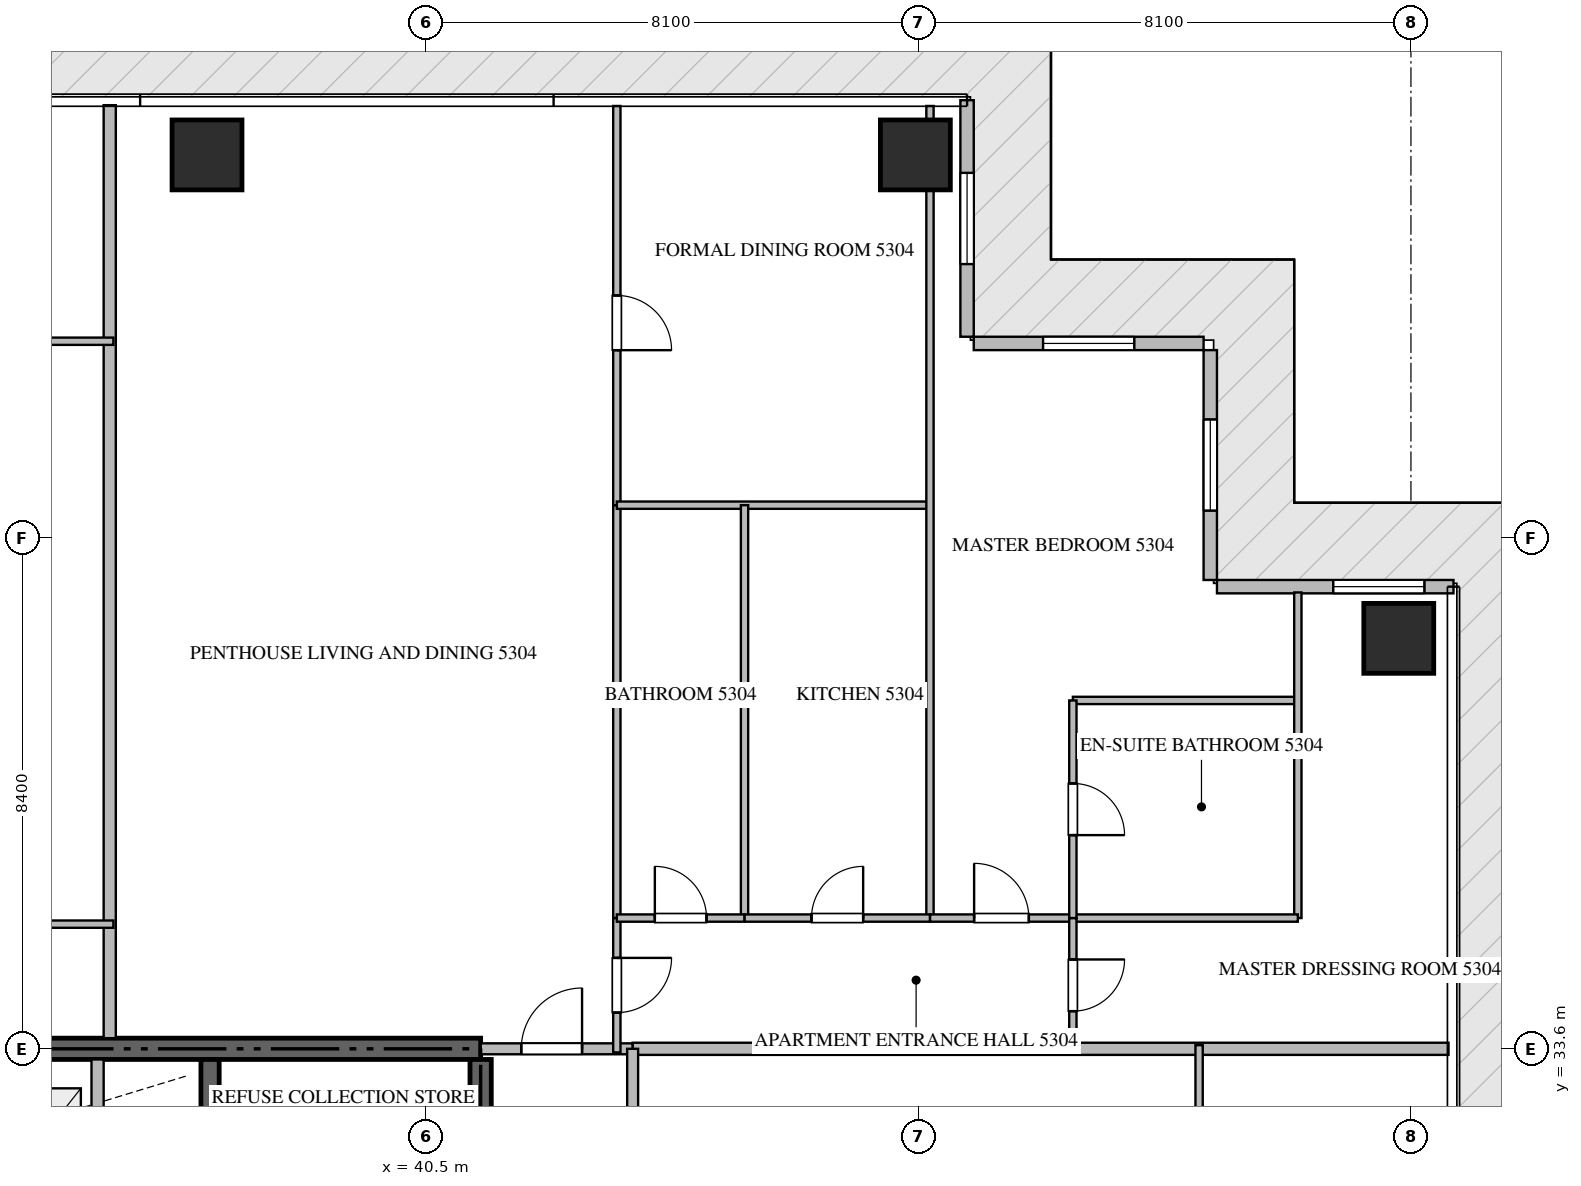
"""IFC4 building model, lengths in metres.
Left out: names, types, materials, properties, quantities, classifications, styles, units other than length and angle.
Written with IfcOpenShell. Run it as: python <this file> out.ifc"""

import sys

from ifc_helpers import new_model, si_unit, direction, frame, frame_2d, origin, origin_2d, place, context, subcontext, project, spatial, rectangle, extrude, source, transform, mapped, element, fill, save


model = new_model("IFC4")
c1 = context("Model", 3, precision=1e-05, world=origin(), true_north=direction((0.0, 1.0)))
c2 = subcontext(c1, "Body", "Model", "MODEL_VIEW")
j1 = project(units=[si_unit("LENGTHUNIT", "METRE"), si_unit("PLANEANGLEUNIT", "RADIAN")], contexts=[c1])
p1 = place(None, origin())
s1 = spatial("IfcSite", under=j1, at=p1, CompositionType="ELEMENT")
p2 = place(p1, origin())
s2 = spatial("IfcBuilding", under=s1, at=p2, CompositionType="ELEMENT")
p3 = place(p2, frame((0.0, 0.0, 214.3)))
s3 = spatial("IfcBuildingStorey", under=s2, at=p3, CompositionType="ELEMENT", Elevation=214.3)
p4 = place(p3, frame((41.4, 33.6, -0.26), z_axis=(0.0, 0.0, 1.0), x_axis=(-1.0, 0.0, 0.0)))
e1 = element("IfcWall", 1, at=p4, inside=s3, PredefinedType="SHEAR", context=c2, shape_type="SweptSolid", body=[
    extrude(rectangle(XDim=18.0, YDim=0.35, at=frame_2d((9.0, 0.0))), origin(), (0.0, 0.0, 1.0), 3.848),
])
p5 = place(p3, frame((41.4, 27.75, -0.26), z_axis=(0.0, 0.0, 1.0), x_axis=(0.0, 1.0, 0.0)))
e2 = element("IfcWall", 2, at=p5, inside=s3, PredefinedType="SHEAR", context=c2, shape_type="SweptSolid", body=[
    extrude(rectangle(XDim=5.675, YDim=0.35, at=frame_2d((2.837, 0.0))), origin(), (0.0, 0.0, 1.0), 3.848),
])
p6 = place(p3, frame((36.95, 27.05, -0.26), z_axis=(0.0, 0.0, 1.0), x_axis=(0.0, 1.0, 0.0)))
e3 = element("IfcWall", 3, at=p6, inside=s3, PredefinedType="SHEAR", context=c2, shape_type="SweptSolid", body=[
    extrude(rectangle(XDim=6.375, YDim=0.3, at=frame_2d((3.188, 0.0))), origin(), (0.0, 0.0, 1.0), 3.848),
])
m1 = source(origin(), c2, "Body", "SweptSolid", [
    extrude(rectangle(XDim=1.15, YDim=1.15, at=origin_2d()), origin(), (0.0, 0.0, 1.0), 3.85),
])
for number, where, z_axis, x_axis in (
    (4, (36.9, 48.3, -0.26), (0.0, 0.0, 1.0), (1.0, 0.0, 0.0)),
    (5, (48.55, 48.3, -0.26), (0.0, 0.0, 1.0), (1.0, 0.0, 0.0)),
    (6, (56.5, 40.35, -0.26), (0.0, 0.0, 1.0), (1.0, 0.0, 0.0)),
):
    element("IfcColumn", number, at=place(p3, frame(where, z_axis=z_axis, x_axis=x_axis)), inside=s3, PredefinedType="COLUMN", context=c2, shape_type="MappedRepresentation", body=[
        mapped(m1, transform((0.0, 0.0, 0.0), scale=1.0)),
    ])
p7 = place(p3, frame((57.4, 41.2, 0.0), z_axis=(0.0, 0.0, 1.0), x_axis=(-1.0, 0.0, 0.0)))
e7 = element("IfcWall", 7, at=p7, inside=s3, PredefinedType="ELEMENTEDWALL", context=c2, shape_type="SweptSolid", body=[
    extrude(rectangle(XDim=3.89, YDim=0.22, at=frame_2d((1.945, 0.0))), origin(), (0.0, 0.0, 1.0), 3.575),
])
p8 = place(p7, frame((0.478, 0.0, 0.65)))
e8 = element("IfcOpeningElement", 8, at=p8, cuts=e7, PredefinedType="OPENING", context=c2, shape_type="SweptSolid", body=[
    extrude(rectangle(XDim=1.5, YDim=2.25, at=frame_2d((0.75, 1.125))), frame((0.0, 0.12, 0.0), z_axis=(0.0, -1.0, 0.0), x_axis=(1.0, 0.0, 0.0)), (0.0, 0.0, 1.0), 0.24),
])
p9 = place(p3, frame((53.4, 41.31, 0.0), z_axis=(0.0, 0.0, 1.0), x_axis=(0.0, 1.0, 0.0)))
e9 = element("IfcWall", 9, at=p9, inside=s3, PredefinedType="ELEMENTEDWALL", context=c2, shape_type="SweptSolid", body=[
    extrude(rectangle(XDim=3.78, YDim=0.22, at=frame_2d((1.89, 0.0))), origin(), (0.0, 0.0, 1.0), 3.575),
])
p10 = place(p9, frame((1.14, 0.0, 0.65)))
e10 = element("IfcOpeningElement", 10, at=p10, cuts=e9, PredefinedType="OPENING", context=c2, shape_type="SweptSolid", body=[
    extrude(rectangle(XDim=1.5, YDim=2.25, at=frame_2d((0.75, 1.125))), frame((0.0, 0.12, 0.0), z_axis=(0.0, -1.0, 0.0), x_axis=(1.0, 0.0, 0.0)), (0.0, 0.0, 1.0), 0.24),
])
p11 = place(p3, frame((53.29, 45.2, 0.0), z_axis=(0.0, 0.0, 1.0), x_axis=(-1.0, 0.0, 0.0)))
e11 = element("IfcWall", 11, at=p11, inside=s3, PredefinedType="ELEMENTEDWALL", context=c2, shape_type="SweptSolid", body=[
    extrude(rectangle(XDim=3.78, YDim=0.22, at=frame_2d((1.89, 0.0))), origin(), (0.0, 0.0, 1.0), 3.575),
])
p12 = place(p11, frame((1.14, 0.0, 0.65)))
e12 = element("IfcOpeningElement", 12, at=p12, cuts=e11, PredefinedType="OPENING", context=c2, shape_type="SweptSolid", body=[
    extrude(rectangle(XDim=1.5, YDim=2.25, at=frame_2d((0.75, 1.125))), frame((0.0, 0.12, 0.0), z_axis=(0.0, -1.0, 0.0), x_axis=(1.0, 0.0, 0.0)), (0.0, 0.0, 1.0), 0.24),
])
p13 = place(p3, frame((49.4, 45.31, 0.0), z_axis=(0.0, 0.0, 1.0), x_axis=(0.0, 1.0, 0.0)))
e13 = element("IfcWall", 13, at=p13, inside=s3, PredefinedType="ELEMENTEDWALL", context=c2, shape_type="SweptSolid", body=[
    extrude(rectangle(XDim=3.89, YDim=0.22, at=frame_2d((1.945, 0.0))), origin(), (0.0, 0.0, 1.0), 3.575),
])
p14 = place(p13, frame((1.195, 0.0, 0.65)))
e14 = element("IfcOpeningElement", 14, at=p14, cuts=e13, PredefinedType="OPENING", context=c2, shape_type="SweptSolid", body=[
    extrude(rectangle(XDim=1.5, YDim=2.25, at=frame_2d((0.75, 1.125))), frame((0.0, 0.12, 0.0), z_axis=(0.0, -1.0, 0.0), x_axis=(1.0, 0.0, 0.0)), (0.0, 0.0, 1.0), 0.24),
])
p15 = place(p3, frame((35.1, 30.75, 0.0), z_axis=(0.0, 0.0, 1.0), x_axis=(0.0, 1.0, 0.0)))
e15 = element("IfcWall", 15, at=p15, inside=s3, PredefinedType="STANDARD", context=c2, shape_type="SweptSolid", body=[
    extrude(rectangle(XDim=2.675, YDim=0.2, at=frame_2d((1.337, 0.0))), origin(), (0.0, 0.0, 1.0), 3.59),
])
p16 = place(p3, frame((35.3, 33.775, 0.0), z_axis=(0.0, 0.0, 1.0), x_axis=(0.0, 1.0, 0.0)))
e16 = element("IfcWall", 16, at=p16, inside=s3, PredefinedType="PARTITIONING", context=c2, shape_type="SweptSolid", body=[
    extrude(rectangle(XDim=15.343, YDim=0.2, at=frame_2d((7.671, 0.0))), origin(), (0.0, 0.0, 1.0), 3.59),
])
p17 = place(p3, frame((43.9, 33.6, 0.0), z_axis=(0.0, 0.0, 1.0), x_axis=(1.0, 0.0, 0.0)))
e17 = element("IfcWall", 17, at=p17, inside=s3, PredefinedType="PARTITIONING", context=c2, shape_type="SweptSolid", body=[
    extrude(rectangle(XDim=13.418, YDim=0.2, at=frame_2d((6.709, 0.0))), origin(), (0.0, 0.0, 1.0), 3.59),
])
p18 = place(p3, frame((41.402, 33.6, 0.0), z_axis=(0.0, 0.0, 1.0), x_axis=(1.0, 0.0, 0.0)))
e18 = element("IfcWall", 18, at=p18, inside=s3, PredefinedType="PARTITIONING", context=c2, shape_type="SweptSolid", body=[
    extrude(rectangle(XDim=2.496, YDim=0.18, at=frame_2d((1.248, 0.0))), origin(), (0.0, 0.0, 1.0), 3.59),
])
p19 = place(p18, frame((0.666, 0.0, 0.0)))
e19 = element("IfcOpeningElement", 19, at=p19, cuts=e18, PredefinedType="OPENING", context=c2, shape_type="SweptSolid", body=[
    extrude(rectangle(XDim=1.0, YDim=2.15, at=frame_2d((0.5, 1.075))), frame((0.0, 0.1, 0.0), z_axis=(0.0, -1.0, 0.0), x_axis=(1.0, 0.0, 0.0)), (0.0, 0.0, 1.0), 0.2),
])
p20 = place(p3, frame((43.9, 16.8, 0.0), z_axis=(0.0, 0.0, 1.0), x_axis=(0.0, 1.0, 0.0)))
e20 = element("IfcWall", 20, at=p20, inside=s3, PredefinedType="PARTITIONING", context=c2, shape_type="SweptSolid", body=[
    extrude(rectangle(XDim=16.8, YDim=0.18, at=frame_2d((8.4, 0.0))), origin(), (0.0, 0.0, 1.0), 3.59),
])
p21 = place(p20, frame((1.3, 0.0, 0.0)))
e21 = element("IfcOpeningElement", 21, at=p21, cuts=e20, PredefinedType="OPENING", context=c2, shape_type="SweptSolid", body=[
    extrude(rectangle(XDim=1.0, YDim=2.15, at=frame_2d((0.5, 1.075))), frame((0.0, 0.1, 0.0), z_axis=(0.0, -1.0, 0.0), x_axis=(1.0, 0.0, 0.0)), (0.0, 0.0, 1.0), 0.2),
])
for number, where, z_axis, x_axis in (
    (22, (26.3, 45.236, 0.0), (0.0, 0.0, 1.0), (1.0, 0.0, 0.0)),
    (23, (26.3, 35.65, 0.0), (0.0, 0.0, 1.0), (1.0, 0.0, 0.0)),
):
    element("IfcWall", number, at=place(p3, frame(where, z_axis=z_axis, x_axis=x_axis)), inside=s3, PredefinedType="PARTITIONING", context=c2, shape_type="SweptSolid", body=[
        extrude(rectangle(XDim=9.06, YDim=0.12, at=frame_2d((4.53, 0.0))), origin(), (0.0, 0.0, 1.0), 3.59),
    ])
p22 = place(p3, frame((43.64, 35.75, 0.0), z_axis=(0.0, 0.0, 1.0), x_axis=(0.0, -1.0, 0.0)))
e24 = element("IfcWall", 24, at=p22, inside=s3, PredefinedType="PARTITIONING", context=c2, shape_type="SweptSolid", body=[
    extrude(rectangle(XDim=2.21, YDim=0.12, at=frame_2d((1.105, 0.0))), origin(), (0.0, 0.0, 1.0), 3.59),
])
p23 = place(p22, frame((0.655, 0.0, 0.0)))
e25 = element("IfcOpeningElement", 25, at=p23, cuts=e24, PredefinedType="OPENING", context=c2, shape_type="SweptSolid", body=[
    extrude(rectangle(XDim=0.9, YDim=2.1, at=frame_2d((0.45, 1.05))), frame((0.0, 0.07, 0.0), z_axis=(0.0, -1.0, 0.0), x_axis=(1.0, 0.0, 0.0)), (0.0, 0.0, 1.0), 0.14),
])
p24 = place(p3, frame((43.64, 49.105, 0.0), z_axis=(0.0, 0.0, 1.0), x_axis=(0.0, -1.0, 0.0)))
e26 = element("IfcWall", 26, at=p24, inside=s3, PredefinedType="PARTITIONING", context=c2, shape_type="SweptSolid", body=[
    extrude(rectangle(XDim=6.565, YDim=0.12, at=frame_2d((3.282, 0.0))), origin(), (0.0, 0.0, 1.0), 3.59),
])
p25 = place(p24, frame((3.116, 0.0, 0.0)))
e27 = element("IfcOpeningElement", 27, at=p25, cuts=e26, PredefinedType="OPENING", context=c2, shape_type="SweptSolid", body=[
    extrude(rectangle(XDim=0.9, YDim=2.1, at=frame_2d((0.45, 1.05))), frame((0.0, 0.07, 0.0), z_axis=(0.0, -1.0, 0.0), x_axis=(1.0, 0.0, 0.0)), (0.0, 0.0, 1.0), 0.14),
])
p26 = place(p3, frame((43.64, 42.538, 0.0), z_axis=(0.0, 0.0, 1.0), x_axis=(0.0, -1.0, 0.0)))
e28 = element("IfcWall", 28, at=p26, inside=s3, PredefinedType="PARTITIONING", context=c2, shape_type="SweptSolid", body=[
    extrude(rectangle(XDim=6.786, YDim=0.12, at=frame_2d((3.393, 0.0))), origin(), (0.0, 0.0, 1.0), 3.59),
])
p27 = place(p3, frame((43.64, 42.54, 0.0), z_axis=(0.0, 0.0, 1.0), x_axis=(1.0, 0.0, 0.0)))
e29 = element("IfcWall", 29, at=p27, inside=s3, PredefinedType="PARTITIONING", context=c2, shape_type="SweptSolid", body=[
    extrude(rectangle(XDim=5.15, YDim=0.12, at=frame_2d((2.575, 0.0))), origin(), (0.0, 0.0, 1.0), 3.59),
])
p28 = place(p3, frame((48.79, 49.105, 0.0), z_axis=(0.0, 0.0, 1.0), x_axis=(0.0, -1.0, 0.0)))
e30 = element("IfcWall", 30, at=p28, inside=s3, PredefinedType="PARTITIONING", context=c2, shape_type="SweptSolid", body=[
    extrude(rectangle(XDim=13.355, YDim=0.12, at=frame_2d((6.677, 0.0))), origin(), (0.0, 0.0, 1.0), 3.122),
])
p29 = place(p3, frame((45.74, 42.54, 0.0), z_axis=(0.0, 0.0, 1.0), x_axis=(0.0, -1.0, 0.0)))
e31 = element("IfcWall", 31, at=p29, inside=s3, PredefinedType="PARTITIONING", context=c2, shape_type="SweptSolid", body=[
    extrude(rectangle(XDim=6.79, YDim=0.12, at=frame_2d((3.395, 0.0))), origin(), (0.0, 0.0, 1.0), 3.59),
])
p30 = place(p3, frame((43.64, 35.75, 0.0), z_axis=(0.0, 0.0, 1.0), x_axis=(1.0, 0.0, 0.0)))
e32 = element("IfcWall", 32, at=p30, inside=s3, PredefinedType="PARTITIONING", context=c2, shape_type="SweptSolid", body=[
    extrude(rectangle(XDim=2.1, YDim=0.12, at=frame_2d((1.05, 0.0))), origin(), (0.0, 0.0, 1.0), 3.59),
])
p31 = place(p30, frame((0.625, 0.0, 0.0)))
e33 = element("IfcOpeningElement", 33, at=p31, cuts=e32, PredefinedType="OPENING", context=c2, shape_type="SweptSolid", body=[
    extrude(rectangle(XDim=0.85, YDim=2.1, at=frame_2d((0.425, 1.05))), frame((0.0, 0.07, 0.0), z_axis=(0.0, -1.0, 0.0), x_axis=(1.0, 0.0, 0.0)), (0.0, 0.0, 1.0), 0.14),
])
p32 = place(p3, frame((45.742, 35.75, 0.0), z_axis=(0.0, 0.0, 1.0), x_axis=(1.0, 0.0, 0.0)))
e34 = element("IfcWall", 34, at=p32, inside=s3, PredefinedType="PARTITIONING", context=c2, shape_type="SweptSolid", body=[
    extrude(rectangle(XDim=3.048, YDim=0.12, at=frame_2d((1.524, 0.0))), origin(), (0.0, 0.0, 1.0), 3.59),
])
p33 = place(p32, frame((1.099, 0.0, 0.0)))
e35 = element("IfcOpeningElement", 35, at=p33, cuts=e34, PredefinedType="OPENING", context=c2, shape_type="SweptSolid", body=[
    extrude(rectangle(XDim=0.85, YDim=2.1, at=frame_2d((0.425, 1.05))), frame((0.0, 0.07, 0.0), z_axis=(0.0, -1.0, 0.0), x_axis=(1.0, 0.0, 0.0)), (0.0, 0.0, 1.0), 0.14),
])
p34 = place(p3, frame((48.792, 35.75, 0.0), z_axis=(0.0, 0.0, 1.0), x_axis=(1.0, 0.0, 0.0)))
e36 = element("IfcWall", 36, at=p34, inside=s3, PredefinedType="PARTITIONING", context=c2, shape_type="SweptSolid", body=[
    extrude(rectangle(XDim=2.348, YDim=0.12, at=frame_2d((1.174, 0.0))), origin(), (0.0, 0.0, 1.0), 3.59),
])
p35 = place(p34, frame((0.724, 0.0, 0.0)))
e37 = element("IfcOpeningElement", 37, at=p35, cuts=e36, PredefinedType="OPENING", context=c2, shape_type="SweptSolid", body=[
    extrude(rectangle(XDim=0.9, YDim=2.1, at=frame_2d((0.45, 1.05))), frame((0.0, 0.07, 0.0), z_axis=(0.0, -1.0, 0.0), x_axis=(1.0, 0.0, 0.0)), (0.0, 0.0, 1.0), 0.14),
])
p36 = place(p3, frame((51.14, 39.329, 0.0), z_axis=(0.0, 0.0, 1.0), x_axis=(1.0, 0.0, 0.0)))
e38 = element("IfcWall", 38, at=p36, inside=s3, PredefinedType="PARTITIONING", context=c2, shape_type="SweptSolid", body=[
    extrude(rectangle(XDim=3.7, YDim=0.12, at=frame_2d((1.85, 0.0))), origin(), (0.0, 0.0, 1.0), 3.59),
])
p37 = place(p3, frame((54.84, 41.105, 0.0), z_axis=(0.0, 0.0, 1.0), x_axis=(0.0, -1.0, 0.0)))
e39 = element("IfcWall", 39, at=p37, inside=s3, PredefinedType="PARTITIONING", context=c2, shape_type="SweptSolid", body=[
    extrude(rectangle(XDim=5.355, YDim=0.12, at=frame_2d((2.677, 0.0))), origin(), (0.0, 0.0, 1.0), 3.59),
])
p38 = place(p3, frame((51.142, 35.75, 0.0), z_axis=(0.0, 0.0, 1.0), x_axis=(1.0, 0.0, 0.0)))
e40 = element("IfcWall", 40, at=p38, inside=s3, PredefinedType="PARTITIONING", context=c2, shape_type="SweptSolid", body=[
    extrude(rectangle(XDim=3.698, YDim=0.12, at=frame_2d((1.849, 0.0))), origin(), (0.0, 0.0, 1.0), 3.59),
])
p39 = place(p3, frame((51.14, 39.329, 0.0), z_axis=(0.0, 0.0, 1.0), x_axis=(0.0, -1.0, 0.0)))
e41 = element("IfcWall", 41, at=p39, inside=s3, PredefinedType="PARTITIONING", context=c2, shape_type="SweptSolid", body=[
    extrude(rectangle(XDim=3.579, YDim=0.12, at=frame_2d((1.79, 0.0))), origin(), (0.0, 0.0, 1.0), 3.59),
])
p40 = place(p39, frame((1.365, 0.0, 0.0)))
e42 = element("IfcOpeningElement", 42, at=p40, cuts=e41, PredefinedType="OPENING", context=c2, shape_type="SweptSolid", body=[
    extrude(rectangle(XDim=0.85, YDim=2.1, at=frame_2d((0.425, 1.05))), frame((0.0, 0.07, 0.0), z_axis=(0.0, -1.0, 0.0), x_axis=(1.0, 0.0, 0.0)), (0.0, 0.0, 1.0), 0.14),
])
p41 = place(p3, frame((51.14, 35.748, 0.0), z_axis=(0.0, 0.0, 1.0), x_axis=(0.0, -1.0, 0.0)))
e43 = element("IfcWall", 43, at=p41, inside=s3, PredefinedType="PARTITIONING", context=c2, shape_type="SweptSolid", body=[
    extrude(rectangle(XDim=2.208, YDim=0.12, at=frame_2d((1.104, 0.0))), origin(), (0.0, 0.0, 1.0), 3.59),
])
p42 = place(p41, frame((0.679, 0.0, 0.0)))
e44 = element("IfcOpeningElement", 44, at=p42, cuts=e43, PredefinedType="OPENING", context=c2, shape_type="SweptSolid", body=[
    extrude(rectangle(XDim=0.85, YDim=2.1, at=frame_2d((0.425, 1.05))), frame((0.0, 0.07, 0.0), z_axis=(0.0, -1.0, 0.0), x_axis=(1.0, 0.0, 0.0)), (0.0, 0.0, 1.0), 0.14),
])
p43 = place(p3, frame((53.216, 23.18, 0.0), z_axis=(0.0, 0.0, 1.0), x_axis=(0.0, 1.0, 0.0)))
e45 = element("IfcWall", 45, at=p43, inside=s3, PredefinedType="PARTITIONING", context=c2, shape_type="SweptSolid", body=[
    extrude(rectangle(XDim=10.48, YDim=0.12, at=frame_2d((5.24, 0.0))), origin(), (0.0, 0.0, 1.0), 3.59),
])
m2 = source(origin(), c2, "Body", "SweptSolid", [
    extrude(rectangle(XDim=1.5, YDim=2.25, at=frame_2d((0.75, 1.125))), frame((0.0, 0.03, 0.0), z_axis=(0.0, -1.0, 0.0), x_axis=(1.0, 0.0, 0.0)), (0.0, 0.0, 1.0), 0.06),
])
p44 = place(p8, origin())
e46 = element("IfcWindow", 46, at=p44, inside=s3, PartitioningType="SINGLE_PANEL", PredefinedType="WINDOW", context=c2, shape_type="MappedRepresentation", body=[
    mapped(m2, transform((0.0, 0.0, 0.0), scale=1.0)),
])
fill(e8, e46)
p45 = place(p10, origin())
e47 = element("IfcWindow", 47, at=p45, inside=s3, PartitioningType="SINGLE_PANEL", PredefinedType="WINDOW", context=c2, shape_type="MappedRepresentation", body=[
    mapped(m2, transform((0.0, 0.0, 0.0), scale=1.0)),
])
fill(e10, e47)
p46 = place(p12, origin())
e48 = element("IfcWindow", 48, at=p46, inside=s3, PartitioningType="SINGLE_PANEL", PredefinedType="WINDOW", context=c2, shape_type="MappedRepresentation", body=[
    mapped(m2, transform((0.0, 0.0, 0.0), scale=1.0)),
])
fill(e12, e48)
p47 = place(p14, origin())
e49 = element("IfcWindow", 49, at=p47, inside=s3, PartitioningType="SINGLE_PANEL", PredefinedType="WINDOW", context=c2, shape_type="MappedRepresentation", body=[
    mapped(m2, transform((0.0, 0.0, 0.0), scale=1.0)),
])
fill(e14, e49)
m3 = source(origin(), c2, "Body", "SweptSolid", [
    extrude(rectangle(XDim=1.0, YDim=2.15, at=frame_2d((0.5, 1.075))), frame((0.0, 0.025, 0.0), z_axis=(0.0, -1.0, 0.0), x_axis=(1.0, 0.0, 0.0)), (0.0, 0.0, 1.0), 0.05),
])
p48 = place(p19, origin())
e50 = element("IfcDoor", 50, at=p48, inside=s3, OperationType="SINGLE_SWING_RIGHT", PredefinedType="DOOR", context=c2, shape_type="MappedRepresentation", body=[
    mapped(m3, transform((0.0, 0.0, 0.0), scale=1.0)),
])
fill(e19, e50)
m4 = source(origin(), c2, "Body", "SweptSolid", [
    extrude(rectangle(XDim=0.9, YDim=2.1, at=frame_2d((0.45, 1.05))), frame((0.0, 0.025, 0.0), z_axis=(0.0, -1.0, 0.0), x_axis=(1.0, 0.0, 0.0)), (0.0, 0.0, 1.0), 0.05),
])
p49 = place(p23, origin())
e51 = element("IfcDoor", 51, at=p49, inside=s3, OperationType="SINGLE_SWING_LEFT", PredefinedType="DOOR", context=c2, shape_type="MappedRepresentation", body=[
    mapped(m4, transform((0.0, 0.0, 0.0), scale=1.0)),
])
fill(e25, e51)
p50 = place(p25, origin())
e52 = element("IfcDoor", 52, at=p50, inside=s3, OperationType="SINGLE_SWING_RIGHT", PredefinedType="DOOR", context=c2, shape_type="MappedRepresentation", body=[
    mapped(m4, transform((0.0, 0.0, 0.0), scale=1.0)),
])
fill(e27, e52)
m5 = source(origin(), c2, "Body", "SweptSolid", [
    extrude(rectangle(XDim=0.85, YDim=2.1, at=frame_2d((0.425, 1.05))), frame((0.0, 0.025, 0.0), z_axis=(0.0, -1.0, 0.0), x_axis=(1.0, 0.0, 0.0)), (0.0, 0.0, 1.0), 0.05),
])
p51 = place(p31, origin())
e53 = element("IfcDoor", 53, at=p51, inside=s3, OperationType="SINGLE_SWING_LEFT", PredefinedType="DOOR", context=c2, shape_type="MappedRepresentation", body=[
    mapped(m5, transform((0.0, 0.0, 0.0), scale=1.0)),
])
fill(e33, e53)
p52 = place(p33, origin())
e54 = element("IfcDoor", 54, at=p52, inside=s3, OperationType="SINGLE_SWING_RIGHT", PredefinedType="DOOR", context=c2, shape_type="MappedRepresentation", body=[
    mapped(m5, transform((0.0, 0.0, 0.0), scale=1.0)),
])
fill(e35, e54)
p53 = place(p35, origin())
e55 = element("IfcDoor", 55, at=p53, inside=s3, OperationType="SINGLE_SWING_LEFT", PredefinedType="DOOR", context=c2, shape_type="MappedRepresentation", body=[
    mapped(m4, transform((0.0, 0.0, 0.0), scale=1.0)),
])
fill(e37, e55)
p54 = place(p40, origin())
e56 = element("IfcDoor", 56, at=p54, inside=s3, OperationType="SINGLE_SWING_RIGHT", PredefinedType="DOOR", context=c2, shape_type="MappedRepresentation", body=[
    mapped(m5, transform((0.0, 0.0, 0.0), scale=1.0)),
])
fill(e42, e56)
p55 = place(p42, origin())
e57 = element("IfcDoor", 57, at=p55, inside=s3, OperationType="SINGLE_SWING_LEFT", PredefinedType="DOOR", context=c2, shape_type="MappedRepresentation", body=[
    mapped(m5, transform((0.0, 0.0, 0.0), scale=1.0)),
])
fill(e44, e57)
save(model, sys.argv[1])
